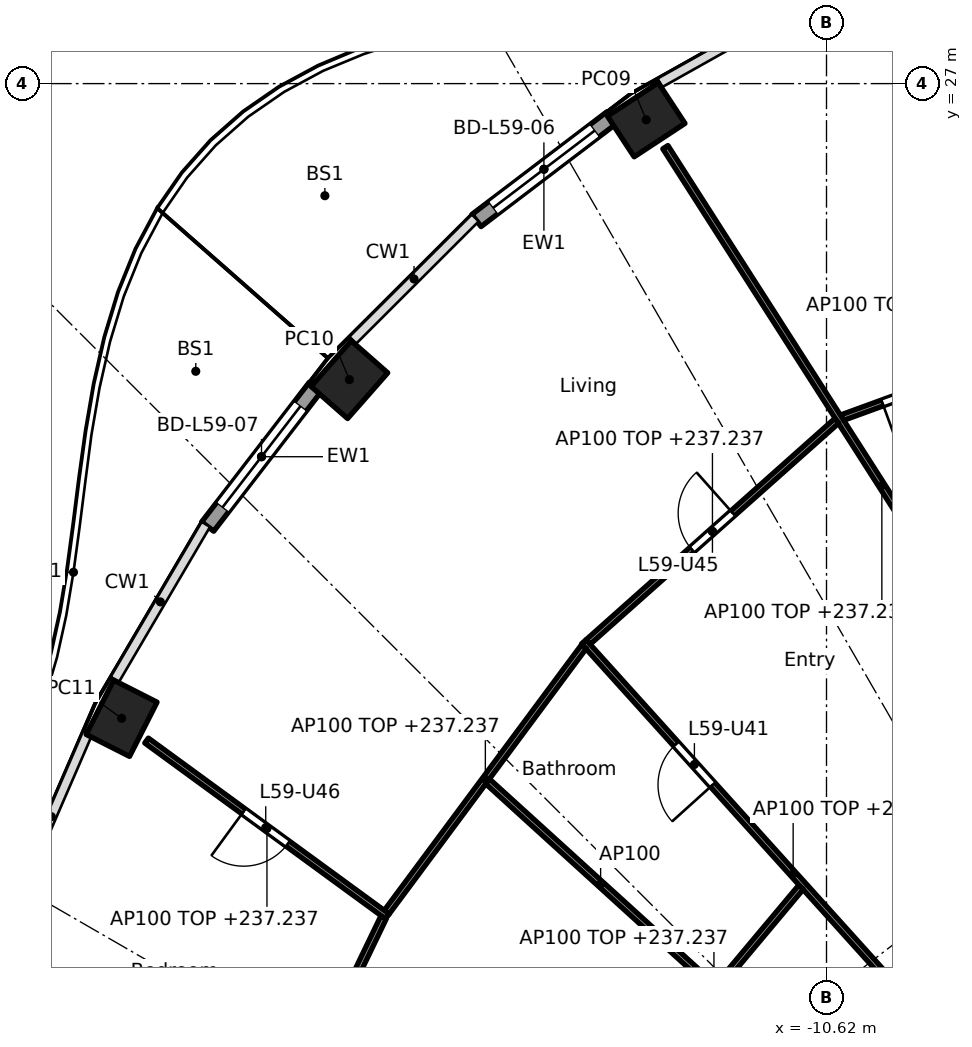
"""IFC4 building model, lengths in metres.
Left out: names, types, materials, properties, quantities, classifications, styles, units other than length and angle.
Written with IfcOpenShell. Run it as: python <this file> out.ifc"""

import sys

from ifc_helpers import new_model, si_unit, direction, frame, frame_2d, origin, origin_2d, place, context, subcontext, project, spatial, rectangle, hollow_rectangle, extrude, element, fill, save


model = new_model("IFC4")
c1 = context("Model", 3, precision=1e-05, world=origin(), true_north=direction((0.0, 1.0)))
c2 = subcontext(c1, "Body", "Model", "MODEL_VIEW")
j1 = project(units=[si_unit("LENGTHUNIT", "METRE"), si_unit("PLANEANGLEUNIT", "RADIAN")], contexts=[c1])
p1 = place(None, origin())
s1 = spatial("IfcSite", under=j1, at=p1, CompositionType="ELEMENT")
p2 = place(p1, origin())
s2 = spatial("IfcBuilding", under=s1, at=p2, CompositionType="ELEMENT")
p3 = place(p2, frame((0.0, 0.0, 234.4)))
s3 = spatial("IfcBuildingStorey", under=s2, at=p3, CompositionType="ELEMENT", Elevation=234.4)
for number, where, z_axis, x_axis in (
    (1, (-13.585, 26.405, 0.0), (0.0, 0.0, 1.0), (-0.836, -0.549, 0.0)),
    (2, (-18.467, 22.132, 0.0), (0.0, 0.0, 1.0), (-0.66, -0.751, 0.0)),
    (3, (-22.212, 16.563, 0.0), (0.0, 0.0, 1.0), (-0.452, -0.892, 0.0)),
):
    element("IfcColumn", number, at=place(p3, frame(where, z_axis=z_axis, x_axis=x_axis)), inside=s3, PredefinedType="COLUMN", context=c2, shape_type="SweptSolid", body=[
        extrude(hollow_rectangle(XDim=1.0, YDim=0.8, WallThickness=0.032, at=origin_2d()), origin(), (0.0, 0.0, 1.0), 3.7),
    ])
p4 = place(p3, frame((-16.377, 24.748, 0.0), z_axis=(0.0, 0.0, 1.0), x_axis=(0.795990084031, 0.60530966135, 0.0)))
e4 = element("IfcWall", 4, at=p4, inside=s3, PredefinedType="SOLIDWALL", context=c2, shape_type="SweptSolid", body=[
    extrude(rectangle(XDim=2.789, YDim=0.25, at=frame_2d((1.394, 0.0))), origin(), (0.0, 0.0, 1.0), 3.44),
])
p5 = place(p4, frame((0.344, 0.0, 0.0)))
e5 = element("IfcOpeningElement", 5, at=p5, cuts=e4, PredefinedType="OPENING", context=c2, shape_type="SweptSolid", body=[
    extrude(rectangle(XDim=2.1, YDim=2.4, at=frame_2d((1.05, 1.2))), frame((0.0, 0.135, 0.0), z_axis=(0.0, -1.0, 0.0), x_axis=(1.0, 0.0, 0.0)), (0.0, 0.0, 1.0), 0.27),
])
p6 = place(p3, frame((-20.797, 19.715, 0.0), z_axis=(0.0, 0.0, 1.0), x_axis=(0.610438565676, 0.792063607001, 0.0)))
e6 = element("IfcWall", 6, at=p6, inside=s3, PredefinedType="SOLIDWALL", context=c2, shape_type="SweptSolid", body=[
    extrude(rectangle(XDim=2.901, YDim=0.25, at=frame_2d((1.45, 0.0))), origin(), (0.0, 0.0, 1.0), 3.44),
])
p7 = place(p6, frame((0.4, 0.0, 0.0)))
e7 = element("IfcOpeningElement", 7, at=p7, cuts=e6, PredefinedType="OPENING", context=c2, shape_type="SweptSolid", body=[
    extrude(rectangle(XDim=2.1, YDim=2.4, at=frame_2d((1.05, 1.2))), frame((0.0, 0.135, 0.0), z_axis=(0.0, -1.0, 0.0), x_axis=(1.0, 0.0, 0.0)), (0.0, 0.0, 1.0), 0.27),
])
p8 = place(p3, frame((-5.275, 12.494, 0.0), z_axis=(0.0, 0.0, 1.0), x_axis=(-0.707106781187, -0.707106781187, 0.0)))
e8 = element("IfcWall", 8, at=p8, inside=s3, PredefinedType="PARTITIONING", context=c2, shape_type="SweptSolid", body=[
    extrude(rectangle(XDim=10.209, YDim=0.2, at=frame_2d((5.104, 0.0))), origin(), (0.0, 0.0, 1.0), 3.44),
])
p9 = place(p8, frame((1.185, 0.0, 0.0)))
e9 = element("IfcOpeningElement", 9, at=p9, cuts=e8, PredefinedType="OPENING", context=c2, shape_type="SweptSolid", body=[
    extrude(rectangle(XDim=1.0, YDim=2.1, at=frame_2d((0.5, 1.05))), frame((0.0, 0.11, 0.0), z_axis=(0.0, -1.0, 0.0), x_axis=(1.0, 0.0, 0.0)), (0.0, 0.0, 1.0), 0.22),
])
p10 = place(p3, frame((-6.014, 23.094, 0.0), z_axis=(0.0, 0.0, 1.0), x_axis=(-0.939417400947, -0.342775359089, 0.0)))
e10 = element("IfcWall", 10, at=p10, inside=s3, PredefinedType="PARTITIONING", context=c2, shape_type="SweptSolid", body=[
    extrude(rectangle(XDim=4.633, YDim=0.1, at=frame_2d((2.316, 0.0))), origin(), (0.0, 0.0, 1.0), 2.837),
])
p11 = place(p10, frame((3.024, 0.0, 0.0)))
e11 = element("IfcOpeningElement", 11, at=p11, cuts=e10, PredefinedType="OPENING", context=c2, shape_type="SweptSolid", body=[
    extrude(rectangle(XDim=0.9, YDim=2.1, at=frame_2d((0.45, 1.05))), frame((0.0, 0.06, 0.0), z_axis=(0.0, -1.0, 0.0), x_axis=(1.0, 0.0, 0.0)), (0.0, 0.0, 1.0), 0.12),
])
p12 = place(p3, frame((-6.15, 14.824, 0.0), z_axis=(0.0, 0.0, 1.0), x_axis=(-0.538870687577, 0.842388498301, 0.0)))
e12 = element("IfcWall", 12, at=p12, inside=s3, PredefinedType="PARTITIONING", context=c2, shape_type="SweptSolid", body=[
    extrude(rectangle(XDim=13.213, YDim=0.1, at=frame_2d((6.606, 0.0))), origin(), (0.0, 0.0, 1.0), 2.837),
])
p13 = place(p12, frame((1.483, 0.0, 0.0)))
e13 = element("IfcOpeningElement", 13, at=p13, cuts=e12, PredefinedType="OPENING", context=c2, shape_type="SweptSolid", body=[
    extrude(rectangle(XDim=0.9, YDim=2.1, at=frame_2d((0.45, 1.05))), frame((0.0, 0.06, 0.0), z_axis=(0.0, -1.0, 0.0), x_axis=(1.0, 0.0, 0.0)), (0.0, 0.0, 1.0), 0.12),
])
p14 = place(p3, frame((-10.45, 21.455, 0.0), z_axis=(0.0, 0.0, 1.0), x_axis=(-0.747150931973, -0.66465441009, 0.0)))
e14 = element("IfcWall", 14, at=p14, inside=s3, PredefinedType="PARTITIONING", context=c2, shape_type="SweptSolid", body=[
    extrude(rectangle(XDim=5.475, YDim=0.1, at=frame_2d((2.737, 0.0))), origin(), (0.0, 0.0, 1.0), 2.837),
])
p15 = place(p14, frame((2.288, 0.0, 0.0)))
e15 = element("IfcOpeningElement", 15, at=p15, cuts=e14, PredefinedType="OPENING", context=c2, shape_type="SweptSolid", body=[
    extrude(rectangle(XDim=0.9, YDim=2.1, at=frame_2d((0.45, 1.05))), frame((0.0, 0.06, 0.0), z_axis=(0.0, -1.0, 0.0), x_axis=(1.0, 0.0, 0.0)), (0.0, 0.0, 1.0), 0.12),
])
p16 = place(p3, frame((-7.725, 10.186, 0.0), z_axis=(0.0, 0.0, 1.0), x_axis=(-0.669819599194, 0.742523874725, 0.0)))
e16 = element("IfcWall", 16, at=p16, inside=s3, PredefinedType="PARTITIONING", context=c2, shape_type="SweptSolid", body=[
    extrude(rectangle(XDim=10.282, YDim=0.1, at=frame_2d((5.141, 0.0))), origin(), (0.0, 0.0, 1.0), 2.762),
])
p17 = place(p16, frame((2.0, 0.0, 0.0)))
e17 = element("IfcOpeningElement", 17, at=p17, cuts=e16, PredefinedType="OPENING", context=c2, shape_type="SweptSolid", body=[
    extrude(rectangle(XDim=0.9, YDim=2.1, at=frame_2d((0.45, 1.05))), frame((0.0, 0.06, 0.0), z_axis=(0.0, -1.0, 0.0), x_axis=(1.0, 0.0, 0.0)), (0.0, 0.0, 1.0), 0.12),
])
p18 = place(p16, frame((7.116, 0.0, 0.0)))
e18 = element("IfcOpeningElement", 18, at=p18, cuts=e16, PredefinedType="OPENING", context=c2, shape_type="SweptSolid", body=[
    extrude(rectangle(XDim=0.9, YDim=2.1, at=frame_2d((0.45, 1.05))), frame((0.0, 0.06, 0.0), z_axis=(0.0, -1.0, 0.0), x_axis=(1.0, 0.0, 0.0)), (0.0, 0.0, 1.0), 0.12),
])
p19 = place(p3, frame((-11.039, 13.785, 0.0), z_axis=(0.0, 0.0, 1.0), x_axis=(-0.642254625966, -0.766491353784, 0.0)))
e19 = element("IfcWall", 19, at=p19, inside=s3, PredefinedType="PARTITIONING", context=c2, shape_type="SweptSolid", body=[
    extrude(rectangle(XDim=4.461, YDim=0.1, at=frame_2d((2.23, 0.0))), origin(), (0.0, 0.0, 1.0), 2.837),
])
p20 = place(p3, frame((-14.608, 17.743, 0.0), z_axis=(0.0, 0.0, 1.0), x_axis=(-0.596174489482, -0.8028548923, 0.0)))
e20 = element("IfcWall", 20, at=p20, inside=s3, PredefinedType="PARTITIONING", context=c2, shape_type="SweptSolid", body=[
    extrude(rectangle(XDim=5.442, YDim=0.1, at=frame_2d((2.721, 0.0))), origin(), (0.0, 0.0, 1.0), 2.837),
])
p21 = place(p3, frame((-12.476, 12.147, 0.0), z_axis=(0.0, 0.0, 1.0), x_axis=(-0.740129203525, 0.672464692077, 0.0)))
e21 = element("IfcWall", 21, at=p21, inside=s3, PredefinedType="PARTITIONING", context=c2, shape_type="SweptSolid", body=[
    extrude(rectangle(XDim=5.022, YDim=0.1, at=frame_2d((2.511, 0.0))), origin(), (0.0, 0.0, 1.0), 3.44),
])
p22 = place(p3, frame((-17.842, 13.304, 0.0), z_axis=(0.0, 0.0, 1.0), x_axis=(-0.807541617862, 0.589810592835, 0.0)))
e22 = element("IfcWall", 22, at=p22, inside=s3, PredefinedType="PARTITIONING", context=c2, shape_type="SweptSolid", body=[
    extrude(rectangle(XDim=4.903, YDim=0.1, at=frame_2d((2.452, 0.0))), origin(), (0.0, 0.0, 1.0), 2.837),
])
p23 = place(p22, frame((2.027, 0.0, 0.0)))
e23 = element("IfcOpeningElement", 23, at=p23, cuts=e22, PredefinedType="OPENING", context=c2, shape_type="SweptSolid", body=[
    extrude(rectangle(XDim=0.9, YDim=2.1, at=frame_2d((0.45, 1.05))), frame((0.0, 0.06, 0.0), z_axis=(0.0, -1.0, 0.0), x_axis=(1.0, 0.0, 0.0)), (0.0, 0.0, 1.0), 0.12),
])
p24 = place(p3, frame((-17.904, 13.289, 0.0), z_axis=(0.0, 0.0, 1.0), x_axis=(-0.43429918566, -0.900768681369, 0.0)))
e24 = element("IfcWall", 24, at=p24, inside=s3, PredefinedType="PARTITIONING", context=c2, shape_type="SweptSolid", body=[
    extrude(rectangle(XDim=5.418, YDim=0.1, at=frame_2d((2.709, 0.0))), origin(), (0.0, 0.0, 1.0), 2.837),
])
p25 = place(p5, origin())
e25 = element("IfcDoor", 25, at=p25, inside=s3, OperationType="SLIDING_TO_LEFT", PredefinedType="DOOR", context=c2, shape_type="SweptSolid", body=[
    extrude(rectangle(XDim=2.1, YDim=2.4, at=frame_2d((1.05, 1.2))), frame((0.0, 0.025, 0.0), z_axis=(0.0, -1.0, 0.0), x_axis=(1.0, 0.0, 0.0)), (0.0, 0.0, 1.0), 0.05),
])
fill(e5, e25)
p26 = place(p7, origin())
e26 = element("IfcDoor", 26, at=p26, inside=s3, OperationType="SLIDING_TO_LEFT", PredefinedType="DOOR", context=c2, shape_type="SweptSolid", body=[
    extrude(rectangle(XDim=2.1, YDim=2.4, at=frame_2d((1.05, 1.2))), frame((0.0, 0.025, 0.0), z_axis=(0.0, -1.0, 0.0), x_axis=(1.0, 0.0, 0.0)), (0.0, 0.0, 1.0), 0.05),
])
fill(e7, e26)
p27 = place(p18, origin())
e27 = element("IfcDoor", 27, at=p27, inside=s3, OperationType="SINGLE_SWING_LEFT", PredefinedType="DOOR", context=c2, shape_type="SweptSolid", body=[
    extrude(rectangle(XDim=0.9, YDim=2.1, at=frame_2d((0.45, 1.05))), frame((0.0, 0.025, 0.0), z_axis=(0.0, -1.0, 0.0), x_axis=(1.0, 0.0, 0.0)), (0.0, 0.0, 1.0), 0.05),
])
fill(e18, e27)
p28 = place(p15, frame((0.9, 0.0, 0.0), x_axis=(-1.0, 0.0, 0.0)))
e28 = element("IfcDoor", 28, at=p28, inside=s3, OperationType="SINGLE_SWING_RIGHT", PredefinedType="DOOR", context=c2, shape_type="SweptSolid", body=[
    extrude(rectangle(XDim=0.9, YDim=2.1, at=frame_2d((0.45, 1.05))), frame((0.0, 0.025, 0.0), z_axis=(0.0, -1.0, 0.0), x_axis=(1.0, 0.0, 0.0)), (0.0, 0.0, 1.0), 0.05),
])
fill(e15, e28)
p29 = place(p23, origin())
e29 = element("IfcDoor", 29, at=p29, inside=s3, OperationType="SINGLE_SWING_RIGHT", PredefinedType="DOOR", context=c2, shape_type="SweptSolid", body=[
    extrude(rectangle(XDim=0.9, YDim=2.1, at=frame_2d((0.45, 1.05))), frame((0.0, 0.025, 0.0), z_axis=(0.0, -1.0, 0.0), x_axis=(1.0, 0.0, 0.0)), (0.0, 0.0, 1.0), 0.05),
])
fill(e23, e29)
p30 = place(p11, origin())
e30 = element("IfcDoor", 30, at=p30, inside=s3, OperationType="SINGLE_SWING_RIGHT", PredefinedType="DOOR", context=c2, shape_type="SweptSolid", body=[
    extrude(rectangle(XDim=0.9, YDim=2.1, at=frame_2d((0.45, 1.05))), frame((0.0, 0.025, 0.0), z_axis=(0.0, -1.0, 0.0), x_axis=(1.0, 0.0, 0.0)), (0.0, 0.0, 1.0), 0.05),
])
fill(e11, e30)
save(model, sys.argv[1])
